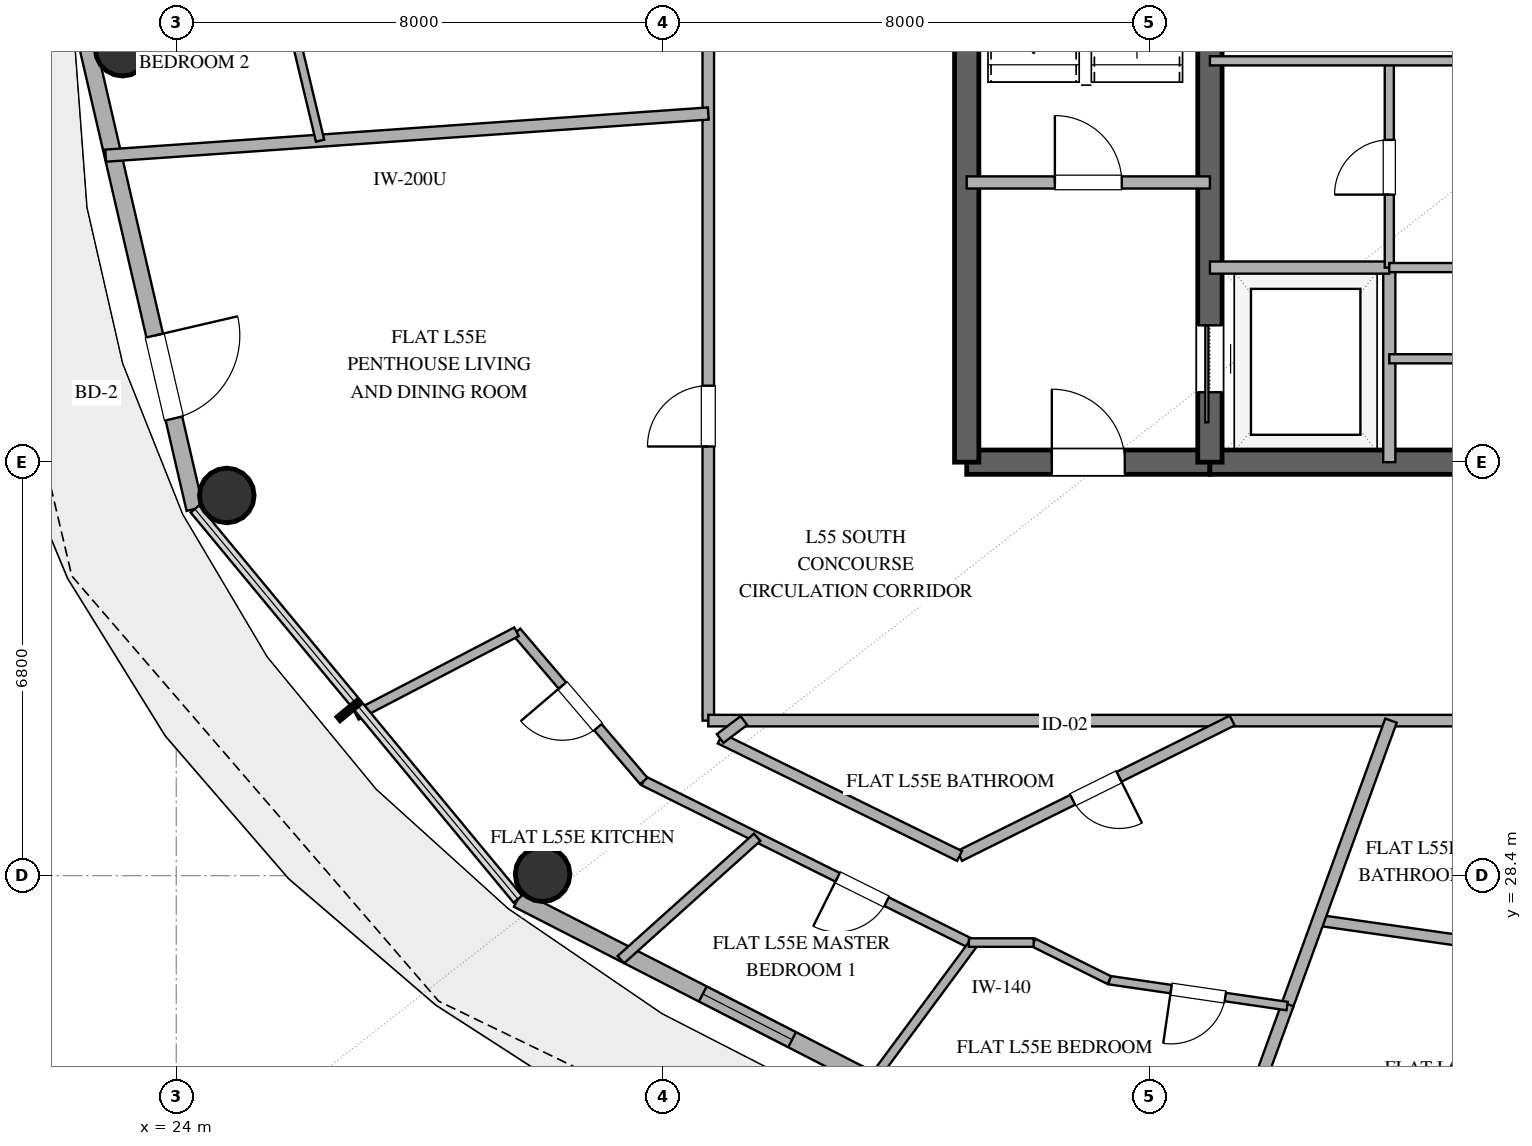
"""IFC4 building model, lengths in metres.
Left out: names, types, materials, properties, quantities, classifications, styles, units other than length and angle.
Written with IfcOpenShell. Run it as: python <this file> out.ifc"""

import sys

from ifc_helpers import new_model, si_unit, direction, frame, frame_2d, origin, origin_2d, place, context, subcontext, project, spatial, rectangle, hollow_circle, extrude, element, fill, save


model = new_model("IFC4")
c1 = context("Model", 3, precision=1e-05, world=origin(), true_north=direction((0.0, 1.0)))
c2 = subcontext(c1, "Body", "Model", "MODEL_VIEW")
j1 = project(units=[si_unit("LENGTHUNIT", "METRE"), si_unit("PLANEANGLEUNIT", "RADIAN")], contexts=[c1])
p1 = place(None, origin())
s1 = spatial("IfcSite", under=j1, at=p1, CompositionType="ELEMENT")
p2 = place(p1, origin())
s2 = spatial("IfcBuilding", under=s1, at=p2, CompositionType="ELEMENT")
p3 = place(p2, frame((0.0, 0.0, 217.2)))
s3 = spatial("IfcBuildingStorey", under=s2, at=p3, CompositionType="ELEMENT", Elevation=217.2)
p4 = place(p3, frame((37.0, 35.2, 0.0), z_axis=(0.0, 0.0, 1.0), x_axis=(1.0, 0.0, 0.0)))
e1 = element("IfcWall", 1, at=p4, inside=s3, PredefinedType="SHEAR", context=c2, shape_type="SweptSolid", body=[
    extrude(rectangle(XDim=4.0, YDim=0.4, at=frame_2d((2.0, 0.0))), origin(), (0.0, 0.0, 1.0), 3.36),
])
p5 = place(p4, frame((1.4, 0.0, 0.0)))
e2 = element("IfcOpeningElement", 2, at=p5, cuts=e1, PredefinedType="OPENING", context=c2, shape_type="SweptSolid", body=[
    extrude(rectangle(XDim=1.2, YDim=2.15, at=frame_2d((0.6, 1.075))), frame((0.0, 0.21, 0.0), z_axis=(0.0, -1.0, 0.0), x_axis=(1.0, 0.0, 0.0)), (0.0, 0.0, 1.0), 0.42),
])
p6 = place(p3, frame((41.0, 35.2, 0.0), z_axis=(0.0, 0.0, 1.0), x_axis=(1.0, 0.0, 0.0)))
e3 = element("IfcWall", 3, at=p6, inside=s3, PredefinedType="SHEAR", context=c2, shape_type="SweptSolid", body=[
    extrude(rectangle(XDim=14.0, YDim=0.4, at=frame_2d((7.0, 0.0))), origin(), (0.0, 0.0, 1.0), 3.36),
])
p7 = place(p6, frame((6.1, 0.0, 0.0)))
e4 = element("IfcOpeningElement", 4, at=p7, cuts=e3, PredefinedType="OPENING", context=c2, shape_type="SweptSolid", body=[
    extrude(rectangle(XDim=1.8, YDim=2.25, at=frame_2d((0.9, 1.125))), frame((0.0, 0.21, 0.0), z_axis=(0.0, -1.0, 0.0), x_axis=(1.0, 0.0, 0.0)), (0.0, 0.0, 1.0), 0.42),
])
p8 = place(p3, frame((37.0, 35.2, 0.0), z_axis=(0.0, 0.0, 1.0), x_axis=(0.0, 1.0, 0.0)))
e5 = element("IfcWall", 5, at=p8, inside=s3, PredefinedType="SHEAR", context=c2, shape_type="SweptSolid", body=[
    extrude(rectangle(XDim=13.6, YDim=0.4, at=frame_2d((6.8, 0.0))), origin(), (0.0, 0.0, 1.0), 3.36),
])
p9 = place(p3, frame((41.0, 35.2, 0.0), z_axis=(0.0, 0.0, 1.0), x_axis=(0.0, 1.0, 0.0)))
e6 = element("IfcWall", 6, at=p9, inside=s3, PredefinedType="SHEAR", context=c2, shape_type="SweptSolid", body=[
    extrude(rectangle(XDim=13.6, YDim=0.4, at=frame_2d((6.8, 0.0))), origin(), (0.0, 0.0, 1.0), 3.36),
])
p10 = place(p9, frame((1.15, 0.0, 0.0)))
e7 = element("IfcOpeningElement", 7, at=p10, cuts=e6, PredefinedType="OPENING", context=c2, shape_type="SweptSolid", body=[
    extrude(rectangle(XDim=1.1, YDim=2.2, at=frame_2d((0.55, 1.1))), frame((0.0, 0.21, 0.0), z_axis=(0.0, -1.0, 0.0), x_axis=(1.0, 0.0, 0.0)), (0.0, 0.0, 1.0), 0.42),
])
for number, where, z_axis, x_axis in (
    (8, (23.117, 42.0, 0.0), (0.0, 0.0, 1.0), (1.0, 0.0, 0.0)),
    (9, (24.831, 34.653, 0.0), (0.0, 0.0, 1.0), (1.0, 0.0, 0.0)),
    (10, (30.025, 28.424, 0.0), (0.0, 0.0, 1.0), (1.0, 0.0, 0.0)),
):
    element("IfcColumn", number, at=place(p3, frame(where, z_axis=z_axis, x_axis=x_axis)), inside=s3, PredefinedType="COLUMN", context=c2, shape_type="SweptSolid", body=[
        extrude(hollow_circle(Radius=0.45, WallThickness=0.025, at=origin_2d()), origin(), (0.0, 0.0, 1.0), 3.36),
    ])
p11 = place(p3, frame((22.553, 42.0, 0.0), z_axis=(0.0, 0.0, 1.0), x_axis=(0.225635078214, -0.974211892495, 0.0)))
e11 = element("IfcWall", 11, at=p11, inside=s3, PredefinedType="SOLIDWALL", context=c2, shape_type="SweptSolid", body=[
    extrude(rectangle(XDim=7.77, YDim=0.28, at=frame_2d((3.885, 0.0))), origin(), (0.0, 0.0, 1.0), 3.36),
])
p12 = place(p11, frame((4.842, 0.0, 0.0)))
e12 = element("IfcOpeningElement", 12, at=p12, cuts=e11, PredefinedType="OPENING", context=c2, shape_type="SweptSolid", body=[
    extrude(rectangle(XDim=1.4, YDim=2.2, at=frame_2d((0.7, 1.1))), frame((0.0, 0.15, 0.0), z_axis=(0.0, -1.0, 0.0), x_axis=(1.0, 0.0, 0.0)), (0.0, 0.0, 1.0), 0.3),
])
p13 = place(p3, frame((29.617, 28.013, 0.0), z_axis=(0.0, 0.0, 1.0), x_axis=(0.890007394051, -0.455946091699, 0.0)))
e13 = element("IfcWall", 13, at=p13, inside=s3, PredefinedType="SOLIDWALL", context=c2, shape_type="SweptSolid", body=[
    extrude(rectangle(XDim=9.404, YDim=0.28, at=frame_2d((4.702, 0.0))), origin(), (0.0, 0.0, 1.0), 3.36),
])
p14 = place(p13, frame((3.418, 0.0, 0.85)))
e14 = element("IfcOpeningElement", 14, at=p14, cuts=e13, PredefinedType="OPENING", context=c2, shape_type="SweptSolid", body=[
    extrude(rectangle(XDim=1.65, YDim=2.0, at=frame_2d((0.825, 1.0))), frame((0.0, 0.15, 0.0), z_axis=(0.0, -1.0, 0.0), x_axis=(1.0, 0.0, 0.0)), (0.0, 0.0, 1.0), 0.3),
])
p15 = place(p13, frame((6.866, 0.0, 0.85)))
e15 = element("IfcOpeningElement", 15, at=p15, cuts=e13, PredefinedType="OPENING", context=c2, shape_type="SweptSolid", body=[
    extrude(rectangle(XDim=1.0, YDim=1.8, at=frame_2d((0.5, 0.9))), frame((0.0, 0.15, 0.0), z_axis=(0.0, -1.0, 0.0), x_axis=(1.0, 0.0, 0.0)), (0.0, 0.0, 1.0), 0.3),
])
p16 = place(p3, frame((37.0, 39.8, 0.0), z_axis=(0.0, 0.0, 1.0), x_axis=(1.0, 0.0, 0.0)))
e16 = element("IfcWall", 16, at=p16, inside=s3, PredefinedType="SOLIDWALL", context=c2, shape_type="SweptSolid", body=[
    extrude(rectangle(XDim=4.0, YDim=0.2, at=frame_2d((2.0, 0.0))), origin(), (0.0, 0.0, 1.0), 2.72),
])
p17 = place(p16, frame((1.45, 0.0, 0.0)))
e17 = element("IfcOpeningElement", 17, at=p17, cuts=e16, PredefinedType="OPENING", context=c2, shape_type="SweptSolid", body=[
    extrude(rectangle(XDim=1.1, YDim=2.15, at=frame_2d((0.55, 1.075))), frame((0.0, 0.11, 0.0), z_axis=(0.0, -1.0, 0.0), x_axis=(1.0, 0.0, 0.0)), (0.0, 0.0, 1.0), 0.22),
])
p18 = place(p3, frame((43.95, 35.2, 0.0), z_axis=(0.0, 0.0, 1.0), x_axis=(0.0, 1.0, 0.0)))
e18 = element("IfcWall", 18, at=p18, inside=s3, PredefinedType="SOLIDWALL", context=c2, shape_type="SweptSolid", body=[
    extrude(rectangle(XDim=3.2, YDim=0.2, at=frame_2d((1.6, 0.0))), origin(), (0.0, 0.0, 1.0), 2.72),
])
p19 = place(p3, frame((41.0, 38.4, 0.0), z_axis=(0.0, 0.0, 1.0), x_axis=(1.0, 0.0, 0.0)))
e19 = element("IfcWall", 19, at=p19, inside=s3, PredefinedType="SOLIDWALL", context=c2, shape_type="SweptSolid", body=[
    extrude(rectangle(XDim=2.95, YDim=0.2, at=frame_2d((1.475, 0.0))), origin(), (0.0, 0.0, 1.0), 2.72),
])
p20 = place(p3, frame((43.95, 38.4, 0.0), z_axis=(0.0, 0.0, 1.0), x_axis=(0.0, 1.0, 0.0)))
e20 = element("IfcWall", 20, at=p20, inside=s3, PredefinedType="PARTITIONING", context=c2, shape_type="SweptSolid", body=[
    extrude(rectangle(XDim=3.4, YDim=0.15, at=frame_2d((1.7, 0.0))), origin(), (0.0, 0.0, 1.0), 2.72),
])
p21 = place(p20, frame((1.2, 0.0, 0.0)))
e21 = element("IfcOpeningElement", 21, at=p21, cuts=e20, PredefinedType="OPENING", context=c2, shape_type="SweptSolid", body=[
    extrude(rectangle(XDim=0.9, YDim=2.15, at=frame_2d((0.45, 1.075))), frame((0.0, 0.085, 0.0), z_axis=(0.0, -1.0, 0.0), x_axis=(1.0, 0.0, 0.0)), (0.0, 0.0, 1.0), 0.17),
])
p22 = place(p3, frame((41.0, 41.8, 0.0), z_axis=(0.0, 0.0, 1.0), x_axis=(1.0, 0.0, 0.0)))
e22 = element("IfcWall", 22, at=p22, inside=s3, PredefinedType="PARTITIONING", context=c2, shape_type="SweptSolid", body=[
    extrude(rectangle(XDim=4.6, YDim=0.15, at=frame_2d((2.3, 0.0))), origin(), (0.0, 0.0, 1.0), 2.72),
])
for number, where, z_axis, x_axis in (
    (23, (43.95, 36.9, 0.0), (0.0, 0.0, 1.0), (1.0, 0.0, 0.0)),
    (24, (43.95, 38.4, 0.0), (0.0, 0.0, 1.0), (1.0, 0.0, 0.0)),
):
    element("IfcWall", number, at=place(p3, frame(where, z_axis=z_axis, x_axis=x_axis)), inside=s3, PredefinedType="PARTITIONING", context=c2, shape_type="SweptSolid", body=[
        extrude(rectangle(XDim=2.05, YDim=0.15, at=frame_2d((1.025, 0.0))), origin(), (0.0, 0.0, 1.0), 2.72),
    ])
p23 = place(p3, frame((32.75, 30.95, 0.0), z_axis=(0.0, 0.0, 1.0), x_axis=(0.0, 1.0, 0.0)))
e25 = element("IfcWall", 25, at=p23, inside=s3, PredefinedType="PARTITIONING", context=c2, shape_type="SweptSolid", body=[
    extrude(rectangle(XDim=12.471, YDim=0.19, at=frame_2d((6.236, 0.0))), origin(), (0.0, 0.0, 1.0), 2.72),
])
p24 = place(p23, frame((4.508, 0.0, 0.0)))
e26 = element("IfcOpeningElement", 26, at=p24, cuts=e25, PredefinedType="OPENING", context=c2, shape_type="SweptSolid", body=[
    extrude(rectangle(XDim=1.0, YDim=2.2, at=frame_2d((0.5, 1.1))), frame((0.0, 0.105, 0.0), z_axis=(0.0, -1.0, 0.0), x_axis=(1.0, 0.0, 0.0)), (0.0, 0.0, 1.0), 0.21),
])
p25 = place(p3, frame((45.87, 30.95, 0.0), z_axis=(0.0, 0.0, 1.0), x_axis=(-1.0, 0.0, 0.0)))
e27 = element("IfcWall", 27, at=p25, inside=s3, PredefinedType="PARTITIONING", context=c2, shape_type="SweptSolid", body=[
    extrude(rectangle(XDim=13.12, YDim=0.19, at=frame_2d((6.56, 0.0))), origin(), (0.0, 0.0, 1.0), 2.72),
])
p26 = place(p3, frame((32.75, 40.934, 0.0), z_axis=(0.0, 0.0, 1.0), x_axis=(-0.997563620801, -0.069762615023, 0.0)))
e28 = element("IfcWall", 28, at=p26, inside=s3, PredefinedType="PARTITIONING", context=c2, shape_type="SweptSolid", body=[
    extrude(rectangle(XDim=9.935, YDim=0.2, at=frame_2d((4.968, 0.0))), origin(), (0.0, 0.0, 1.0), 2.72),
])
p27 = place(p3, frame((41.366, 30.95, 0.0), z_axis=(0.0, 0.0, 1.0), x_axis=(-0.895701232799, -0.444656385946, 0.0)))
e29 = element("IfcWall", 29, at=p27, inside=s3, PredefinedType="PLUMBINGWALL", context=c2, shape_type="SweptSolid", body=[
    extrude(rectangle(XDim=5.006, YDim=0.18, at=frame_2d((2.503, 0.0))), origin(), (0.0, 0.0, 1.0), 2.72),
])
p28 = place(p27, frame((2.078, 0.0, 0.0)))
e30 = element("IfcOpeningElement", 30, at=p28, cuts=e29, PredefinedType="OPENING", context=c2, shape_type="SweptSolid", body=[
    extrude(rectangle(XDim=0.85, YDim=2.1, at=frame_2d((0.425, 1.05))), frame((0.0, 0.1, 0.0), z_axis=(0.0, -1.0, 0.0), x_axis=(1.0, 0.0, 0.0)), (0.0, 0.0, 1.0), 0.2),
])
p29 = place(p3, frame((36.882, 28.724, 0.0), z_axis=(0.0, 0.0, 1.0), x_axis=(-0.897797301304, 0.440408907461, 0.0)))
e31 = element("IfcWall", 31, at=p29, inside=s3, PredefinedType="PLUMBINGWALL", context=c2, shape_type="SweptSolid", body=[
    extrude(rectangle(XDim=4.385, YDim=0.18, at=frame_2d((2.193, 0.0))), origin(), (0.0, 0.0, 1.0), 2.72),
])
p30 = place(p3, frame((37.036, 27.3, 0.0), z_axis=(0.0, 0.0, 1.0), x_axis=(-0.895471406875, 0.445119039661, 0.0)))
e32 = element("IfcWall", 32, at=p30, inside=s3, PredefinedType="PLUMBINGWALL", context=c2, shape_type="SweptSolid", body=[
    extrude(rectangle(XDim=5.971, YDim=0.16, at=frame_2d((2.986, 0.0))), origin(), (0.0, 0.0, 1.0), 2.72),
])
p31 = place(p30, frame((1.512, 0.0, 0.0)))
e33 = element("IfcOpeningElement", 33, at=p31, cuts=e32, PredefinedType="OPENING", context=c2, shape_type="SweptSolid", body=[
    extrude(rectangle(XDim=0.9, YDim=2.1, at=frame_2d((0.45, 1.05))), frame((0.0, 0.09, 0.0), z_axis=(0.0, -1.0, 0.0), x_axis=(1.0, 0.0, 0.0)), (0.0, 0.0, 1.0), 0.18),
])
p32 = place(p3, frame((42.783, 27.666, 0.0), z_axis=(0.0, 0.0, 1.0), x_axis=(0.989925187984, -0.141591391669, 0.0)))
e34 = element("IfcWall", 34, at=p32, inside=s3, PredefinedType="PLUMBINGWALL", context=c2, shape_type="SweptSolid", body=[
    extrude(rectangle(XDim=3.819, YDim=0.18, at=frame_2d((1.91, 0.0))), origin(), (0.0, 0.0, 1.0), 2.72),
])
p33 = place(p3, frame((43.978, 30.95, 0.0), z_axis=(0.0, 0.0, 1.0), x_axis=(-0.34200203284, -0.939699212266, 0.0)))
e35 = element("IfcWall", 35, at=p33, inside=s3, PredefinedType="PARTITIONING", context=c2, shape_type="SweptSolid", body=[
    extrude(rectangle(XDim=4.996, YDim=0.2, at=frame_2d((2.498, 0.0))), origin(), (0.0, 0.0, 1.0), 2.72),
])
p34 = place(p3, frame((41.133, 23.134, 0.0), z_axis=(0.0, 0.0, 1.0), x_axis=(0.342000121366, 0.939699907942, 0.0)))
e36 = element("IfcWall", 36, at=p34, inside=s3, PredefinedType="PARTITIONING", context=c2, shape_type="SweptSolid", body=[
    extrude(rectangle(XDim=3.355, YDim=0.2, at=frame_2d((1.678, 0.0))), origin(), (0.0, 0.0, 1.0), 2.72),
])
p35 = place(p3, frame((31.689, 29.958, 0.0), z_axis=(0.0, 0.0, 1.0), x_axis=(-0.649012353166, 0.760777868657, 0.0)))
e37 = element("IfcWall", 37, at=p35, inside=s3, PredefinedType="PLUMBINGWALL", context=c2, shape_type="SweptSolid", body=[
    extrude(rectangle(XDim=3.224, YDim=0.16, at=frame_2d((1.612, 0.0))), origin(), (0.0, 0.0, 1.0), 2.72),
])
p36 = place(p35, frame((1.162, 0.0, 0.0)))
e38 = element("IfcOpeningElement", 38, at=p36, cuts=e37, PredefinedType="OPENING", context=c2, shape_type="SweptSolid", body=[
    extrude(rectangle(XDim=0.9, YDim=2.1, at=frame_2d((0.45, 1.05))), frame((0.0, 0.09, 0.0), z_axis=(0.0, -1.0, 0.0), x_axis=(1.0, 0.0, 0.0)), (0.0, 0.0, 1.0), 0.18),
])
p37 = place(p3, frame((31.312, 27.019, 0.0), z_axis=(0.0, 0.0, 1.0), x_axis=(0.744144111532, 0.668019117445, 0.0)))
e39 = element("IfcWall", 39, at=p37, inside=s3, PredefinedType="PLUMBINGWALL", context=c2, shape_type="SweptSolid", body=[
    extrude(rectangle(XDim=3.011, YDim=0.16, at=frame_2d((1.506, 0.0))), origin(), (0.0, 0.0, 1.0), 2.72),
])
p38 = place(p3, frame((29.596, 32.411, 0.0), z_axis=(0.0, 0.0, 1.0), x_axis=(-0.886874801181, -0.462009834344, 0.0)))
e40 = element("IfcWall", 40, at=p38, inside=s3, PredefinedType="PLUMBINGWALL", context=c2, shape_type="SweptSolid", body=[
    extrude(rectangle(XDim=2.971, YDim=0.16, at=frame_2d((1.485, 0.0))), origin(), (0.0, 0.0, 1.0), 2.72),
])
p39 = place(p3, frame((42.27, 26.256, 0.0), z_axis=(0.0, 0.0, 1.0), x_axis=(-0.989530523264, 0.144323745545, 0.0)))
e41 = element("IfcWall", 41, at=p39, inside=s3, PredefinedType="PARTITIONING", context=c2, shape_type="SweptSolid", body=[
    extrude(rectangle(XDim=2.955, YDim=0.14, at=frame_2d((1.478, 0.0))), origin(), (0.0, 0.0, 1.0), 2.72),
])
p40 = place(p39, frame((1.028, 0.0, 0.0)))
e42 = element("IfcOpeningElement", 42, at=p40, cuts=e41, PredefinedType="OPENING", context=c2, shape_type="SweptSolid", body=[
    extrude(rectangle(XDim=0.9, YDim=2.1, at=frame_2d((0.45, 1.05))), frame((0.0, 0.08, 0.0), z_axis=(0.0, -1.0, 0.0), x_axis=(1.0, 0.0, 0.0)), (0.0, 0.0, 1.0), 0.16),
])
p41 = place(p3, frame((35.371, 24.933, 0.0), z_axis=(0.0, 0.0, 1.0), x_axis=(0.594787288624, 0.803883126637, 0.0)))
e43 = element("IfcWall", 43, at=p41, inside=s3, PredefinedType="PARTITIONING", context=c2, shape_type="SweptSolid", body=[
    extrude(rectangle(XDim=2.945, YDim=0.15, at=frame_2d((1.472, 0.0))), origin(), (0.0, 0.0, 1.0), 2.72),
])
p42 = place(p3, frame((26.004, 42.0, 0.0), z_axis=(0.0, 0.0, 1.0), x_axis=(0.232292411737, -0.972645996984, 0.0)))
e44 = element("IfcWall", 44, at=p42, inside=s3, PredefinedType="PARTITIONING", context=c2, shape_type="SweptSolid", body=[
    extrude(rectangle(XDim=1.555, YDim=0.14, at=frame_2d((0.778, 0.0))), origin(), (0.0, 0.0, 1.0), 2.72),
])
p43 = place(p3, frame((39.345, 26.682, 0.0), z_axis=(0.0, 0.0, 1.0), x_axis=(-0.895584310315, 0.444891833053, 0.0)))
e45 = element("IfcWall", 45, at=p43, inside=s3, PredefinedType="PARTITIONING", context=c2, shape_type="SweptSolid", body=[
    extrude(rectangle(XDim=1.389, YDim=0.14, at=frame_2d((0.694, 0.0))), origin(), (0.0, 0.0, 1.0), 2.72),
])
p44 = place(p3, frame((38.101, 27.3, 0.0), z_axis=(0.0, 0.0, 1.0), x_axis=(-1.0, 0.0, 0.0)))
e46 = element("IfcWall", 46, at=p44, inside=s3, PredefinedType="PARTITIONING", context=c2, shape_type="SweptSolid", body=[
    extrude(rectangle(XDim=1.065, YDim=0.14, at=frame_2d((0.533, 0.0))), origin(), (0.0, 0.0, 1.0), 2.72),
])
p45 = place(p3, frame((32.945, 30.655, 0.0), z_axis=(0.0, 0.0, 1.0), x_axis=(0.798681895285, 0.601753462927, 0.0)))
e47 = element("IfcWall", 47, at=p45, inside=s3, PredefinedType="PLUMBINGWALL", context=c2, shape_type="SweptSolid", body=[
    extrude(rectangle(XDim=0.49, YDim=0.18, at=frame_2d((0.245, 0.0))), origin(), (0.0, 0.0, 1.0), 2.72),
])
p46 = place(p12, origin())
e48 = element("IfcDoor", 48, at=p46, inside=s3, OperationType="SINGLE_SWING_LEFT", PredefinedType="DOOR", context=c2, shape_type="SweptSolid", body=[
    extrude(rectangle(XDim=1.4, YDim=2.2, at=frame_2d((0.7, 1.1))), frame((0.0, 0.025, 0.0), z_axis=(0.0, -1.0, 0.0), x_axis=(1.0, 0.0, 0.0)), (0.0, 0.0, 1.0), 0.05),
])
fill(e12, e48)
p47 = place(p14, origin())
e49 = element("IfcWindow", 49, at=p47, inside=s3, PartitioningType="SINGLE_PANEL", PredefinedType="WINDOW", context=c2, shape_type="SweptSolid", body=[
    extrude(rectangle(XDim=1.65, YDim=2.0, at=frame_2d((0.825, 1.0))), frame((0.0, 0.03, 0.0), z_axis=(0.0, -1.0, 0.0), x_axis=(1.0, 0.0, 0.0)), (0.0, 0.0, 1.0), 0.06),
])
fill(e14, e49)
p48 = place(p10, origin())
e50 = element("IfcDoor", 50, at=p48, inside=s3, OperationType="SLIDING_TO_LEFT", PredefinedType="DOOR", context=c2, shape_type="SweptSolid", body=[
    extrude(rectangle(XDim=1.1, YDim=2.2, at=frame_2d((0.55, 1.1))), frame((0.0, 0.025, 0.0), z_axis=(0.0, -1.0, 0.0), x_axis=(1.0, 0.0, 0.0)), (0.0, 0.0, 1.0), 0.05),
])
fill(e7, e50)
p49 = place(p5, origin())
e51 = element("IfcDoor", 51, at=p49, inside=s3, OperationType="SINGLE_SWING_LEFT", PredefinedType="DOOR", context=c2, shape_type="SweptSolid", body=[
    extrude(rectangle(XDim=1.2, YDim=2.15, at=frame_2d((0.6, 1.075))), frame((0.0, 0.025, 0.0), z_axis=(0.0, -1.0, 0.0), x_axis=(1.0, 0.0, 0.0)), (0.0, 0.0, 1.0), 0.05),
])
fill(e2, e51)
p50 = place(p17, origin())
e52 = element("IfcDoor", 52, at=p50, inside=s3, OperationType="SINGLE_SWING_LEFT", PredefinedType="DOOR", context=c2, shape_type="SweptSolid", body=[
    extrude(rectangle(XDim=1.1, YDim=2.15, at=frame_2d((0.55, 1.075))), frame((0.0, 0.025, 0.0), z_axis=(0.0, -1.0, 0.0), x_axis=(1.0, 0.0, 0.0)), (0.0, 0.0, 1.0), 0.05),
])
fill(e17, e52)
p51 = place(p21, origin())
e53 = element("IfcDoor", 53, at=p51, inside=s3, OperationType="SINGLE_SWING_LEFT", PredefinedType="DOOR", context=c2, shape_type="SweptSolid", body=[
    extrude(rectangle(XDim=0.9, YDim=2.15, at=frame_2d((0.45, 1.075))), frame((0.0, 0.025, 0.0), z_axis=(0.0, -1.0, 0.0), x_axis=(1.0, 0.0, 0.0)), (0.0, 0.0, 1.0), 0.05),
])
fill(e21, e53)
p52 = place(p24, origin())
e54 = element("IfcDoor", 54, at=p52, inside=s3, OperationType="SINGLE_SWING_LEFT", PredefinedType="DOOR", context=c2, shape_type="SweptSolid", body=[
    extrude(rectangle(XDim=1.0, YDim=2.2, at=frame_2d((0.5, 1.1))), frame((0.0, 0.025, 0.0), z_axis=(0.0, -1.0, 0.0), x_axis=(1.0, 0.0, 0.0)), (0.0, 0.0, 1.0), 0.05),
])
fill(e26, e54)
p53 = place(p28, origin())
e55 = element("IfcDoor", 55, at=p53, inside=s3, OperationType="SINGLE_SWING_LEFT", PredefinedType="DOOR", context=c2, shape_type="SweptSolid", body=[
    extrude(rectangle(XDim=0.85, YDim=2.1, at=frame_2d((0.425, 1.05))), frame((0.0, 0.025, 0.0), z_axis=(0.0, -1.0, 0.0), x_axis=(1.0, 0.0, 0.0)), (0.0, 0.0, 1.0), 0.05),
])
fill(e30, e55)
p54 = place(p31, origin())
e56 = element("IfcDoor", 56, at=p54, inside=s3, OperationType="SINGLE_SWING_RIGHT", PredefinedType="DOOR", context=c2, shape_type="SweptSolid", body=[
    extrude(rectangle(XDim=0.9, YDim=2.1, at=frame_2d((0.45, 1.05))), frame((0.0, 0.025, 0.0), z_axis=(0.0, -1.0, 0.0), x_axis=(1.0, 0.0, 0.0)), (0.0, 0.0, 1.0), 0.05),
])
fill(e33, e56)
p55 = place(p36, origin())
e57 = element("IfcDoor", 57, at=p55, inside=s3, OperationType="SINGLE_SWING_RIGHT", PredefinedType="DOOR", context=c2, shape_type="SweptSolid", body=[
    extrude(rectangle(XDim=0.9, YDim=2.1, at=frame_2d((0.45, 1.05))), frame((0.0, 0.025, 0.0), z_axis=(0.0, -1.0, 0.0), x_axis=(1.0, 0.0, 0.0)), (0.0, 0.0, 1.0), 0.05),
])
fill(e38, e57)
p56 = place(p40, origin())
e58 = element("IfcDoor", 58, at=p56, inside=s3, OperationType="SINGLE_SWING_RIGHT", PredefinedType="DOOR", context=c2, shape_type="SweptSolid", body=[
    extrude(rectangle(XDim=0.9, YDim=2.1, at=frame_2d((0.45, 1.05))), frame((0.0, 0.025, 0.0), z_axis=(0.0, -1.0, 0.0), x_axis=(1.0, 0.0, 0.0)), (0.0, 0.0, 1.0), 0.05),
])
fill(e42, e58)
save(model, sys.argv[1])
